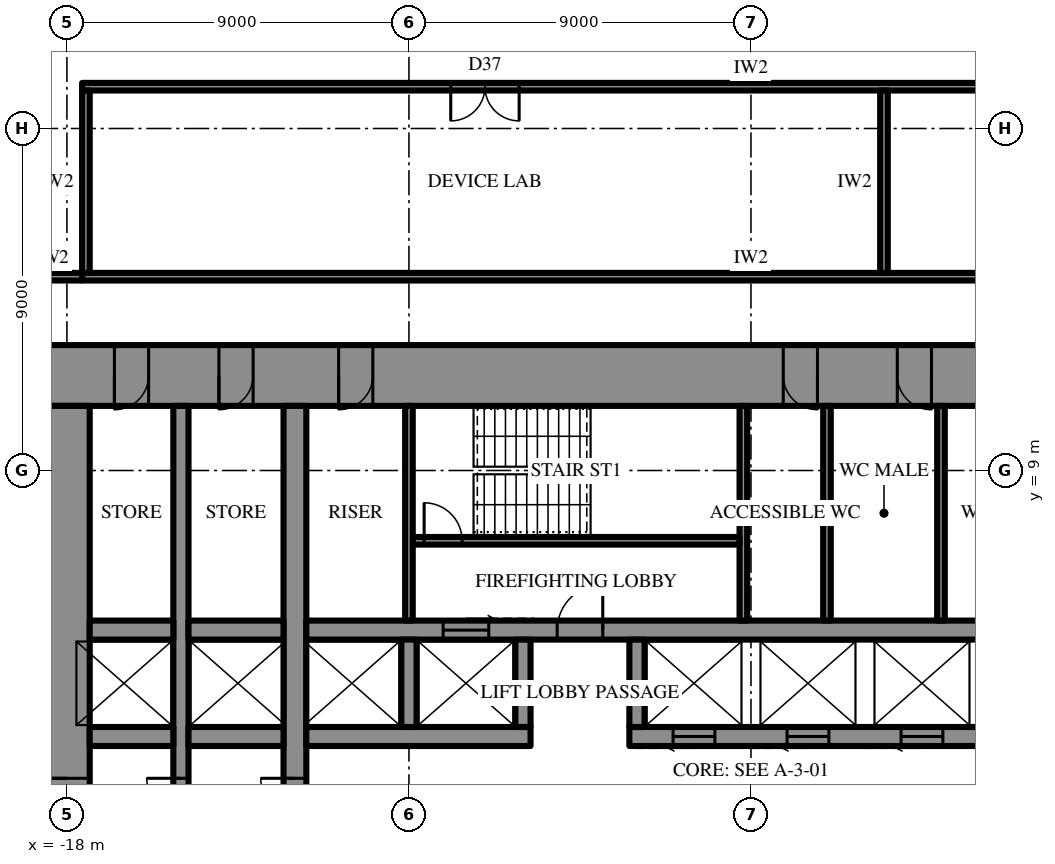
"""IFC4 building model, lengths in metres.
Left out: names, types, materials, properties, quantities, classifications, styles, units other than length and angle.
Written with IfcOpenShell. Run it as: python <this file> out.ifc"""

import sys

from ifc_helpers import new_model, si_unit, direction, frame, frame_2d, origin, place, context, subcontext, project, spatial, rectangle, extrude, element, fill, save


model = new_model("IFC4")
c1 = context("Model", 3, precision=1e-05, world=origin(), true_north=direction((0.0, 1.0)))
c2 = subcontext(c1, "Body", "Model", "MODEL_VIEW")
j1 = project(units=[si_unit("LENGTHUNIT", "METRE"), si_unit("PLANEANGLEUNIT", "RADIAN")], contexts=[c1])
p1 = place(None, origin())
s1 = spatial("IfcSite", under=j1, at=p1, CompositionType="ELEMENT")
p2 = place(p1, origin())
s2 = spatial("IfcBuilding", under=s1, at=p2, CompositionType="ELEMENT")
p3 = place(p2, frame((0.0, 0.0, 48.7)))
s3 = spatial("IfcBuildingStorey", under=s2, at=p3, CompositionType="ELEMENT", Elevation=48.7)
p4 = place(p3, frame((-18.6, 11.5, 0.0), z_axis=(0.0, 0.0, 1.0), x_axis=(1.0, 0.0, 0.0)))
e1 = element("IfcWall", 1, at=p4, inside=s3, PredefinedType="SHEAR", context=c2, shape_type="SweptSolid", body=[
    extrude(rectangle(XDim=37.2, YDim=1.6, at=frame_2d((18.6, 0.0))), origin(), (0.0, 0.0, 1.0), 4.2),
])
p5 = place(p4, frame((19.45, 0.0, 0.0)))
e2 = element("IfcOpeningElement", 2, at=p5, cuts=e1, PredefinedType="OPENING", context=c2, shape_type="SweptSolid", body=[
    extrude(rectangle(XDim=0.9, YDim=2.2, at=frame_2d((0.45, 1.1))), frame((0.0, 0.81, 0.0), z_axis=(0.0, -1.0, 0.0), x_axis=(1.0, 0.0, 0.0)), (0.0, 0.0, 1.0), 1.62),
])
p6 = place(p4, frame((22.45, 0.0, 0.0)))
e3 = element("IfcOpeningElement", 3, at=p6, cuts=e1, PredefinedType="OPENING", context=c2, shape_type="SweptSolid", body=[
    extrude(rectangle(XDim=0.9, YDim=2.2, at=frame_2d((0.45, 1.1))), frame((0.0, 0.81, 0.0), z_axis=(0.0, -1.0, 0.0), x_axis=(1.0, 0.0, 0.0)), (0.0, 0.0, 1.0), 1.62),
])
p7 = place(p4, frame((25.5, 0.0, 0.0)))
e4 = element("IfcOpeningElement", 4, at=p7, cuts=e1, PredefinedType="OPENING", context=c2, shape_type="SweptSolid", body=[
    extrude(rectangle(XDim=1.0, YDim=2.2, at=frame_2d((0.5, 1.1))), frame((0.0, 0.81, 0.0), z_axis=(0.0, -1.0, 0.0), x_axis=(1.0, 0.0, 0.0)), (0.0, 0.0, 1.0), 1.62),
])
p8 = place(p4, frame((1.85, 0.0, 0.0)))
e5 = element("IfcOpeningElement", 5, at=p8, cuts=e1, PredefinedType="OPENING", context=c2, shape_type="SweptSolid", body=[
    extrude(rectangle(XDim=0.9, YDim=2.2, at=frame_2d((0.45, 1.1))), frame((0.0, 0.81, 0.0), z_axis=(0.0, -1.0, 0.0), x_axis=(1.0, 0.0, 0.0)), (0.0, 0.0, 1.0), 1.62),
])
p9 = place(p4, frame((4.6, 0.0, 0.0)))
e6 = element("IfcOpeningElement", 6, at=p9, cuts=e1, PredefinedType="OPENING", context=c2, shape_type="SweptSolid", body=[
    extrude(rectangle(XDim=0.9, YDim=2.2, at=frame_2d((0.45, 1.1))), frame((0.0, 0.81, 0.0), z_axis=(0.0, -1.0, 0.0), x_axis=(1.0, 0.0, 0.0)), (0.0, 0.0, 1.0), 1.62),
])
p10 = place(p4, frame((7.75, 0.0, 0.0)))
e7 = element("IfcOpeningElement", 7, at=p10, cuts=e1, PredefinedType="OPENING", context=c2, shape_type="SweptSolid", body=[
    extrude(rectangle(XDim=0.9, YDim=2.2, at=frame_2d((0.45, 1.1))), frame((0.0, 0.81, 0.0), z_axis=(0.0, -1.0, 0.0), x_axis=(1.0, 0.0, 0.0)), (0.0, 0.0, 1.0), 1.62),
])
p11 = place(p4, frame((28.55, 0.0, 0.0)))
e8 = element("IfcOpeningElement", 8, at=p11, cuts=e1, PredefinedType="OPENING", context=c2, shape_type="SweptSolid", body=[
    extrude(rectangle(XDim=0.9, YDim=2.2, at=frame_2d((0.45, 1.1))), frame((0.0, 0.81, 0.0), z_axis=(0.0, -1.0, 0.0), x_axis=(1.0, 0.0, 0.0)), (0.0, 0.0, 1.0), 1.62),
])
p12 = place(p4, frame((31.7, 0.0, 0.0)))
e9 = element("IfcOpeningElement", 9, at=p12, cuts=e1, PredefinedType="OPENING", context=c2, shape_type="SweptSolid", body=[
    extrude(rectangle(XDim=0.9, YDim=2.2, at=frame_2d((0.45, 1.1))), frame((0.0, 0.81, 0.0), z_axis=(0.0, -1.0, 0.0), x_axis=(1.0, 0.0, 0.0)), (0.0, 0.0, 1.0), 1.62),
])
p13 = place(p4, frame((34.45, 0.0, 0.0)))
e10 = element("IfcOpeningElement", 10, at=p13, cuts=e1, PredefinedType="OPENING", context=c2, shape_type="SweptSolid", body=[
    extrude(rectangle(XDim=0.9, YDim=2.2, at=frame_2d((0.45, 1.1))), frame((0.0, 0.81, 0.0), z_axis=(0.0, -1.0, 0.0), x_axis=(1.0, 0.0, 0.0)), (0.0, 0.0, 1.0), 1.62),
])
p14 = place(p3, frame((-18.0, 10.7, 0.0), z_axis=(0.0, 0.0, 1.0), x_axis=(0.0, -1.0, 0.0)))
e11 = element("IfcWall", 11, at=p14, inside=s3, PredefinedType="SHEAR", context=c2, shape_type="SweptSolid", body=[
    extrude(rectangle(XDim=21.4, YDim=1.2, at=frame_2d((10.7, 0.0))), origin(), (0.0, 0.0, 1.0), 4.2),
])
p15 = place(p14, frame((9.8, 0.0, 0.0)))
e12 = element("IfcOpeningElement", 12, at=p15, cuts=e11, PredefinedType="OPENING", context=c2, shape_type="SweptSolid", body=[
    extrude(rectangle(XDim=1.8, YDim=2.4, at=frame_2d((0.9, 1.2))), frame((0.0, 0.61, 0.0), z_axis=(0.0, -1.0, 0.0), x_axis=(1.0, 0.0, 0.0)), (0.0, 0.0, 1.0), 1.22),
])
p16 = place(p3, frame((-12.0, -10.7, 0.0), z_axis=(0.0, 0.0, 1.0), x_axis=(0.0, 1.0, 0.0)))
e13 = element("IfcWall", 13, at=p16, inside=s3, PredefinedType="SHEAR", context=c2, shape_type="SweptSolid", body=[
    extrude(rectangle(XDim=21.4, YDim=0.6, at=frame_2d((10.7, 0.0))), origin(), (0.0, 0.0, 1.0), 4.2),
])
p17 = place(p16, frame((9.8, 0.0, 0.0)))
e14 = element("IfcOpeningElement", 14, at=p17, cuts=e13, PredefinedType="OPENING", context=c2, shape_type="SweptSolid", body=[
    extrude(rectangle(XDim=1.8, YDim=2.4, at=frame_2d((0.9, 1.2))), frame((0.0, 0.31, 0.0), z_axis=(0.0, -1.0, 0.0), x_axis=(1.0, 0.0, 0.0)), (0.0, 0.0, 1.0), 0.62),
])
p18 = place(p3, frame((-15.0, -10.7, 0.0), z_axis=(0.0, 0.0, 1.0), x_axis=(0.0, 1.0, 0.0)))
e15 = element("IfcWall", 15, at=p18, inside=s3, PredefinedType="SHEAR", context=c2, shape_type="SweptSolid", body=[
    extrude(rectangle(XDim=21.4, YDim=0.4, at=frame_2d((10.7, 0.0))), origin(), (0.0, 0.0, 1.0), 4.2),
])
p19 = place(p18, frame((9.8, 0.0, 0.0)))
e16 = element("IfcOpeningElement", 16, at=p19, cuts=e15, PredefinedType="OPENING", context=c2, shape_type="SweptSolid", body=[
    extrude(rectangle(XDim=1.8, YDim=2.4, at=frame_2d((0.9, 1.2))), frame((0.0, 0.21, 0.0), z_axis=(0.0, -1.0, 0.0), x_axis=(1.0, 0.0, 0.0)), (0.0, 0.0, 1.0), 0.42),
])
p20 = place(p3, frame((-17.4, 2.0, 0.0), z_axis=(0.0, 0.0, 1.0), x_axis=(1.0, 0.0, 0.0)))
e17 = element("IfcWall", 17, at=p20, inside=s3, PredefinedType="SHEAR", context=c2, shape_type="SweptSolid", body=[
    extrude(rectangle(XDim=2.2, YDim=0.5, at=frame_2d((1.1, 0.0))), origin(), (0.0, 0.0, 1.0), 4.2),
])
p21 = place(p3, frame((-14.8, 2.0, 0.0), z_axis=(0.0, 0.0, 1.0), x_axis=(1.0, 0.0, 0.0)))
e18 = element("IfcWall", 18, at=p21, inside=s3, PredefinedType="SHEAR", context=c2, shape_type="SweptSolid", body=[
    extrude(rectangle(XDim=2.5, YDim=0.5, at=frame_2d((1.25, 0.0))), origin(), (0.0, 0.0, 1.0), 4.2),
])
p22 = place(p3, frame((-11.7, 2.0, 0.0), z_axis=(0.0, 0.0, 1.0), x_axis=(1.0, 0.0, 0.0)))
e19 = element("IfcWall", 19, at=p22, inside=s3, PredefinedType="SHEAR", context=c2, shape_type="SweptSolid", body=[
    extrude(rectangle(XDim=5.9, YDim=0.5, at=frame_2d((2.95, 0.0))), origin(), (0.0, 0.0, 1.0), 4.2),
])
p23 = place(p3, frame((-3.2, 2.0, 0.0), z_axis=(0.0, 0.0, 1.0), x_axis=(1.0, 0.0, 0.0)))
e20 = element("IfcWall", 20, at=p23, inside=s3, PredefinedType="SHEAR", context=c2, shape_type="SweptSolid", body=[
    extrude(rectangle(XDim=14.9, YDim=0.5, at=frame_2d((7.45, 0.0))), origin(), (0.0, 0.0, 1.0), 4.2),
])
p24 = place(p23, frame((1.15, 0.0, 0.0)))
e21 = element("IfcOpeningElement", 21, at=p24, cuts=e20, PredefinedType="OPENING", context=c2, shape_type="SweptSolid", body=[
    extrude(rectangle(XDim=1.1, YDim=2.2, at=frame_2d((0.55, 1.1))), frame((0.0, 0.26, 0.0), z_axis=(0.0, -1.0, 0.0), x_axis=(1.0, 0.0, 0.0)), (0.0, 0.0, 1.0), 0.52),
])
p25 = place(p23, frame((4.15, 0.0, 0.0)))
e22 = element("IfcOpeningElement", 22, at=p25, cuts=e20, PredefinedType="OPENING", context=c2, shape_type="SweptSolid", body=[
    extrude(rectangle(XDim=1.1, YDim=2.2, at=frame_2d((0.55, 1.1))), frame((0.0, 0.26, 0.0), z_axis=(0.0, -1.0, 0.0), x_axis=(1.0, 0.0, 0.0)), (0.0, 0.0, 1.0), 0.52),
])
p26 = place(p23, frame((7.15, 0.0, 0.0)))
e23 = element("IfcOpeningElement", 23, at=p26, cuts=e20, PredefinedType="OPENING", context=c2, shape_type="SweptSolid", body=[
    extrude(rectangle(XDim=1.1, YDim=2.2, at=frame_2d((0.55, 1.1))), frame((0.0, 0.26, 0.0), z_axis=(0.0, -1.0, 0.0), x_axis=(1.0, 0.0, 0.0)), (0.0, 0.0, 1.0), 0.52),
])
p27 = place(p23, frame((10.15, 0.0, 0.0)))
e24 = element("IfcOpeningElement", 24, at=p27, cuts=e20, PredefinedType="OPENING", context=c2, shape_type="SweptSolid", body=[
    extrude(rectangle(XDim=1.1, YDim=2.2, at=frame_2d((0.55, 1.1))), frame((0.0, 0.26, 0.0), z_axis=(0.0, -1.0, 0.0), x_axis=(1.0, 0.0, 0.0)), (0.0, 0.0, 1.0), 0.52),
])
p28 = place(p3, frame((-17.4, 4.8, 0.0), z_axis=(0.0, 0.0, 1.0), x_axis=(1.0, 0.0, 0.0)))
e25 = element("IfcWall", 25, at=p28, inside=s3, PredefinedType="SHEAR", context=c2, shape_type="SweptSolid", body=[
    extrude(rectangle(XDim=2.2, YDim=0.5, at=frame_2d((1.1, 0.0))), origin(), (0.0, 0.0, 1.0), 4.2),
])
p29 = place(p3, frame((-14.8, 4.8, 0.0), z_axis=(0.0, 0.0, 1.0), x_axis=(1.0, 0.0, 0.0)))
e26 = element("IfcWall", 26, at=p29, inside=s3, PredefinedType="SHEAR", context=c2, shape_type="SweptSolid", body=[
    extrude(rectangle(XDim=2.5, YDim=0.5, at=frame_2d((1.25, 0.0))), origin(), (0.0, 0.0, 1.0), 4.2),
])
p30 = place(p3, frame((-11.7, 4.8, 0.0), z_axis=(0.0, 0.0, 1.0), x_axis=(1.0, 0.0, 0.0)))
e27 = element("IfcWall", 27, at=p30, inside=s3, PredefinedType="SHEAR", context=c2, shape_type="SweptSolid", body=[
    extrude(rectangle(XDim=23.4, YDim=0.5, at=frame_2d((11.7, 0.0))), origin(), (0.0, 0.0, 1.0), 4.2),
])
p31 = place(p30, frame((6.6, 0.0, 0.0)))
e28 = element("IfcOpeningElement", 28, at=p31, cuts=e27, PredefinedType="OPENING", context=c2, shape_type="SweptSolid", body=[
    extrude(rectangle(XDim=1.2, YDim=2.2, at=frame_2d((0.6, 1.1))), frame((0.0, 0.26, 0.0), z_axis=(0.0, -1.0, 0.0), x_axis=(1.0, 0.0, 0.0)), (0.0, 0.0, 1.0), 0.52),
])
p32 = place(p30, frame((3.6, 0.0, 0.0)))
e29 = element("IfcOpeningElement", 29, at=p32, cuts=e27, PredefinedType="OPENING", context=c2, shape_type="SweptSolid", body=[
    extrude(rectangle(XDim=1.2, YDim=2.2, at=frame_2d((0.6, 1.1))), frame((0.0, 0.26, 0.0), z_axis=(0.0, -1.0, 0.0), x_axis=(1.0, 0.0, 0.0)), (0.0, 0.0, 1.0), 0.52),
])
for number, where, z_axis, x_axis in (
    (30, (-9.0, 2.25, 0.0), (0.0, 0.0, 1.0), (0.0, 1.0, 0.0)),
    (31, (-6.0, 2.25, 0.0), (0.0, 0.0, 1.0), (0.0, 1.0, 0.0)),
    (32, (-3.0, 2.25, 0.0), (0.0, 0.0, 1.0), (0.0, 1.0, 0.0)),
):
    element("IfcWall", number, at=place(p3, frame(where, z_axis=z_axis, x_axis=x_axis)), inside=s3, PredefinedType="SHEAR", context=c2, shape_type="SweptSolid", body=[
        extrude(rectangle(XDim=2.3, YDim=0.4, at=frame_2d((1.15, 0.0))), origin(), (0.0, 0.0, 1.0), 4.2),
    ])
p33 = place(p3, frame((-0.2, 5.05, 0.0), z_axis=(0.0, 0.0, 1.0), x_axis=(0.0, 1.0, 0.0)))
e33 = element("IfcWall", 33, at=p33, inside=s3, PredefinedType="SHEAR", context=c2, shape_type="SweptSolid", body=[
    extrude(rectangle(XDim=5.65, YDim=0.2, at=frame_2d((2.825, 0.0))), origin(), (0.0, 0.0, 1.0), 4.2),
])
p34 = place(p3, frame((-8.9, 7.15, 0.0), z_axis=(0.0, 0.0, 1.0), x_axis=(1.0, 0.0, 0.0)))
e34 = element("IfcWall", 34, at=p34, inside=s3, PredefinedType="SHEAR", context=c2, shape_type="SweptSolid", body=[
    extrude(rectangle(XDim=8.6, YDim=0.2, at=frame_2d((4.3, 0.0))), origin(), (0.0, 0.0, 1.0), 4.2),
])
p35 = place(p34, frame((0.3, 0.0, 0.0)))
e35 = element("IfcOpeningElement", 35, at=p35, cuts=e34, PredefinedType="OPENING", context=c2, shape_type="SweptSolid", body=[
    extrude(rectangle(XDim=1.0, YDim=2.2, at=frame_2d((0.5, 1.1))), frame((0.0, 0.11, 0.0), z_axis=(0.0, -1.0, 0.0), x_axis=(1.0, 0.0, 0.0)), (0.0, 0.0, 1.0), 0.22),
])
for number, where, z_axis, x_axis in (
    (36, (-9.0, 5.05, 0.0), (0.0, 0.0, 1.0), (0.0, 1.0, 0.0)),
    (37, (2.0, 5.05, 0.0), (0.0, 0.0, 1.0), (0.0, 1.0, 0.0)),
    (38, (5.0, 5.05, 0.0), (0.0, 0.0, 1.0), (0.0, 1.0, 0.0)),
):
    element("IfcWall", number, at=place(p3, frame(where, z_axis=z_axis, x_axis=x_axis)), inside=s3, PredefinedType="PARTITIONING", context=c2, shape_type="SweptSolid", body=[
        extrude(rectangle(XDim=5.65, YDim=0.2, at=frame_2d((2.825, 0.0))), origin(), (0.0, 0.0, 1.0), 4.0),
    ])
p36 = place(p3, frame((-17.6, 14.1, 0.0), z_axis=(0.0, 0.0, 1.0), x_axis=(1.0, 0.0, 0.0)))
e39 = element("IfcWall", 39, at=p36, inside=s3, PredefinedType="PARTITIONING", context=c2, shape_type="SweptSolid", body=[
    extrude(rectangle(XDim=35.2, YDim=0.2, at=frame_2d((17.6, 0.0))), origin(), (0.0, 0.0, 1.0), 4.0),
])
p37 = place(p3, frame((-17.6, 19.1, 0.0), z_axis=(0.0, 0.0, 1.0), x_axis=(1.0, 0.0, 0.0)))
e40 = element("IfcWall", 40, at=p37, inside=s3, PredefinedType="PARTITIONING", context=c2, shape_type="SweptSolid", body=[
    extrude(rectangle(XDim=35.2, YDim=0.2, at=frame_2d((17.6, 0.0))), origin(), (0.0, 0.0, 1.0), 4.0),
])
p38 = place(p37, frame((9.7, 0.0, 0.0)))
e41 = element("IfcOpeningElement", 41, at=p38, cuts=e40, PredefinedType="OPENING", context=c2, shape_type="SweptSolid", body=[
    extrude(rectangle(XDim=1.8, YDim=2.4, at=frame_2d((0.9, 1.2))), frame((0.0, 0.11, 0.0), z_axis=(0.0, -1.0, 0.0), x_axis=(1.0, 0.0, 0.0)), (0.0, 0.0, 1.0), 0.22),
])
p39 = place(p37, frame((27.2, 0.0, 0.0)))
e42 = element("IfcOpeningElement", 42, at=p39, cuts=e40, PredefinedType="OPENING", context=c2, shape_type="SweptSolid", body=[
    extrude(rectangle(XDim=1.8, YDim=2.4, at=frame_2d((0.9, 1.2))), frame((0.0, 0.11, 0.0), z_axis=(0.0, -1.0, 0.0), x_axis=(1.0, 0.0, 0.0)), (0.0, 0.0, 1.0), 0.22),
])
for number, where, z_axis, x_axis in (
    (43, (-17.5, 14.2, 0.0), (0.0, 0.0, 1.0), (0.0, 1.0, 0.0)),
    (44, (3.5, 14.2, 0.0), (0.0, 0.0, 1.0), (0.0, 1.0, 0.0)),
):
    element("IfcWall", number, at=place(p3, frame(where, z_axis=z_axis, x_axis=x_axis)), inside=s3, PredefinedType="PARTITIONING", context=c2, shape_type="SweptSolid", body=[
        extrude(rectangle(XDim=4.8, YDim=0.2, at=frame_2d((2.4, 0.0))), origin(), (0.0, 0.0, 1.0), 4.0),
    ])
p40 = place(p3, frame((-19.2, 14.1, 0.0), z_axis=(0.0, 0.0, 1.0), x_axis=(1.0, 0.0, 0.0)))
e45 = element("IfcWall", 45, at=p40, inside=s3, PredefinedType="PARTITIONING", context=c2, shape_type="SweptSolid", body=[
    extrude(rectangle(XDim=1.6, YDim=0.2, at=frame_2d((0.8, 0.0))), origin(), (0.0, 0.0, 1.0), 4.0),
])
p41 = place(p15, frame((1.8, 0.0, 0.0), z_axis=(0.0, 0.0, 1.0), x_axis=(-1.0, 0.0, 0.0)))
e46 = element("IfcDoor", 46, at=p41, inside=s3, OperationType="DOUBLE_DOOR_SINGLE_SWING", PredefinedType="DOOR", context=c2, shape_type="SweptSolid", body=[
    extrude(rectangle(XDim=1.8, YDim=2.4, at=frame_2d((0.9, 1.2))), frame((0.0, 0.025, 0.0), z_axis=(0.0, -1.0, 0.0), x_axis=(1.0, 0.0, 0.0)), (0.0, 0.0, 1.0), 0.05),
])
fill(e12, e46)
p42 = place(p31, origin())
e47 = element("IfcDoor", 47, at=p42, inside=s3, OperationType="SINGLE_SWING_LEFT", PredefinedType="DOOR", context=c2, shape_type="SweptSolid", body=[
    extrude(rectangle(XDim=1.2, YDim=2.2, at=frame_2d((0.6, 1.1))), frame((0.0, 0.025, 0.0), z_axis=(0.0, -1.0, 0.0), x_axis=(1.0, 0.0, 0.0)), (0.0, 0.0, 1.0), 0.05),
])
fill(e28, e47)
p43 = place(p35, origin())
e48 = element("IfcDoor", 48, at=p43, inside=s3, OperationType="SINGLE_SWING_RIGHT", PredefinedType="DOOR", context=c2, shape_type="SweptSolid", body=[
    extrude(rectangle(XDim=1.0, YDim=2.2, at=frame_2d((0.5, 1.1))), frame((0.0, 0.025, 0.0), z_axis=(0.0, -1.0, 0.0), x_axis=(1.0, 0.0, 0.0)), (0.0, 0.0, 1.0), 0.05),
])
fill(e35, e48)
p44 = place(p5, frame((0.9, 0.0, 0.0), z_axis=(0.0, 0.0, 1.0), x_axis=(-1.0, 0.0, 0.0)))
e49 = element("IfcDoor", 49, at=p44, inside=s3, OperationType="SINGLE_SWING_RIGHT", PredefinedType="DOOR", context=c2, shape_type="SweptSolid", body=[
    extrude(rectangle(XDim=0.9, YDim=2.2, at=frame_2d((0.45, 1.1))), frame((0.0, 0.025, 0.0), z_axis=(0.0, -1.0, 0.0), x_axis=(1.0, 0.0, 0.0)), (0.0, 0.0, 1.0), 0.05),
])
fill(e2, e49)
p45 = place(p6, frame((0.9, 0.0, 0.0), z_axis=(0.0, 0.0, 1.0), x_axis=(-1.0, 0.0, 0.0)))
e50 = element("IfcDoor", 50, at=p45, inside=s3, OperationType="SINGLE_SWING_RIGHT", PredefinedType="DOOR", context=c2, shape_type="SweptSolid", body=[
    extrude(rectangle(XDim=0.9, YDim=2.2, at=frame_2d((0.45, 1.1))), frame((0.0, 0.025, 0.0), z_axis=(0.0, -1.0, 0.0), x_axis=(1.0, 0.0, 0.0)), (0.0, 0.0, 1.0), 0.05),
])
fill(e3, e50)
p46 = place(p8, frame((0.9, 0.0, 0.0), z_axis=(0.0, 0.0, 1.0), x_axis=(-1.0, 0.0, 0.0)))
e51 = element("IfcDoor", 51, at=p46, inside=s3, OperationType="SINGLE_SWING_LEFT", PredefinedType="DOOR", context=c2, shape_type="SweptSolid", body=[
    extrude(rectangle(XDim=0.9, YDim=2.2, at=frame_2d((0.45, 1.1))), frame((0.0, 0.025, 0.0), z_axis=(0.0, -1.0, 0.0), x_axis=(1.0, 0.0, 0.0)), (0.0, 0.0, 1.0), 0.05),
])
fill(e5, e51)
p47 = place(p9, frame((0.9, 0.0, 0.0), z_axis=(0.0, 0.0, 1.0), x_axis=(-1.0, 0.0, 0.0)))
e52 = element("IfcDoor", 52, at=p47, inside=s3, OperationType="SINGLE_SWING_LEFT", PredefinedType="DOOR", context=c2, shape_type="SweptSolid", body=[
    extrude(rectangle(XDim=0.9, YDim=2.2, at=frame_2d((0.45, 1.1))), frame((0.0, 0.025, 0.0), z_axis=(0.0, -1.0, 0.0), x_axis=(1.0, 0.0, 0.0)), (0.0, 0.0, 1.0), 0.05),
])
fill(e6, e52)
p48 = place(p10, frame((0.9, 0.0, 0.0), z_axis=(0.0, 0.0, 1.0), x_axis=(-1.0, 0.0, 0.0)))
e53 = element("IfcDoor", 53, at=p48, inside=s3, OperationType="SINGLE_SWING_LEFT", PredefinedType="DOOR", context=c2, shape_type="SweptSolid", body=[
    extrude(rectangle(XDim=0.9, YDim=2.2, at=frame_2d((0.45, 1.1))), frame((0.0, 0.025, 0.0), z_axis=(0.0, -1.0, 0.0), x_axis=(1.0, 0.0, 0.0)), (0.0, 0.0, 1.0), 0.05),
])
fill(e7, e53)
p49 = place(p17, origin())
e54 = element("IfcDoor", 54, at=p49, inside=s3, OperationType="DOUBLE_DOOR_SINGLE_SWING", PredefinedType="DOOR", context=c2, shape_type="SweptSolid", body=[
    extrude(rectangle(XDim=1.8, YDim=2.4, at=frame_2d((0.9, 1.2))), frame((0.0, 0.025, 0.0), z_axis=(0.0, -1.0, 0.0), x_axis=(1.0, 0.0, 0.0)), (0.0, 0.0, 1.0), 0.05),
])
fill(e14, e54)
p50 = place(p19, origin())
e55 = element("IfcDoor", 55, at=p50, inside=s3, OperationType="DOUBLE_DOOR_SINGLE_SWING", PredefinedType="DOOR", context=c2, shape_type="SweptSolid", body=[
    extrude(rectangle(XDim=1.8, YDim=2.4, at=frame_2d((0.9, 1.2))), frame((0.0, 0.025, 0.0), z_axis=(0.0, -1.0, 0.0), x_axis=(1.0, 0.0, 0.0)), (0.0, 0.0, 1.0), 0.05),
])
fill(e16, e55)
p51 = place(p32, origin())
e56 = element("IfcDoor", 56, at=p51, inside=s3, OperationType="SLIDING_TO_LEFT", PredefinedType="DOOR", context=c2, shape_type="SweptSolid", body=[
    extrude(rectangle(XDim=1.2, YDim=2.2, at=frame_2d((0.6, 1.1))), frame((0.0, 0.025, 0.0), z_axis=(0.0, -1.0, 0.0), x_axis=(1.0, 0.0, 0.0)), (0.0, 0.0, 1.0), 0.05),
])
fill(e29, e56)
p52 = place(p24, frame((1.1, 0.0, 0.0), z_axis=(0.0, 0.0, 1.0), x_axis=(-1.0, 0.0, 0.0)))
e57 = element("IfcDoor", 57, at=p52, inside=s3, OperationType="SLIDING_TO_LEFT", PredefinedType="DOOR", context=c2, shape_type="SweptSolid", body=[
    extrude(rectangle(XDim=1.1, YDim=2.2, at=frame_2d((0.55, 1.1))), frame((0.0, 0.025, 0.0), z_axis=(0.0, -1.0, 0.0), x_axis=(1.0, 0.0, 0.0)), (0.0, 0.0, 1.0), 0.05),
])
fill(e21, e57)
p53 = place(p25, frame((1.1, 0.0, 0.0), z_axis=(0.0, 0.0, 1.0), x_axis=(-1.0, 0.0, 0.0)))
e58 = element("IfcDoor", 58, at=p53, inside=s3, OperationType="SLIDING_TO_LEFT", PredefinedType="DOOR", context=c2, shape_type="SweptSolid", body=[
    extrude(rectangle(XDim=1.1, YDim=2.2, at=frame_2d((0.55, 1.1))), frame((0.0, 0.025, 0.0), z_axis=(0.0, -1.0, 0.0), x_axis=(1.0, 0.0, 0.0)), (0.0, 0.0, 1.0), 0.05),
])
fill(e22, e58)
p54 = place(p26, frame((1.1, 0.0, 0.0), z_axis=(0.0, 0.0, 1.0), x_axis=(-1.0, 0.0, 0.0)))
e59 = element("IfcDoor", 59, at=p54, inside=s3, OperationType="SLIDING_TO_LEFT", PredefinedType="DOOR", context=c2, shape_type="SweptSolid", body=[
    extrude(rectangle(XDim=1.1, YDim=2.2, at=frame_2d((0.55, 1.1))), frame((0.0, 0.025, 0.0), z_axis=(0.0, -1.0, 0.0), x_axis=(1.0, 0.0, 0.0)), (0.0, 0.0, 1.0), 0.05),
])
fill(e23, e59)
p55 = place(p38, frame((1.8, 0.0, 0.0), z_axis=(0.0, 0.0, 1.0), x_axis=(-1.0, 0.0, 0.0)))
e60 = element("IfcDoor", 60, at=p55, inside=s3, OperationType="DOUBLE_DOOR_SINGLE_SWING", PredefinedType="DOOR", context=c2, shape_type="SweptSolid", body=[
    extrude(rectangle(XDim=1.8, YDim=2.4, at=frame_2d((0.9, 1.2))), frame((0.0, 0.025, 0.0), z_axis=(0.0, -1.0, 0.0), x_axis=(1.0, 0.0, 0.0)), (0.0, 0.0, 1.0), 0.05),
])
fill(e41, e60)
save(model, sys.argv[1])
